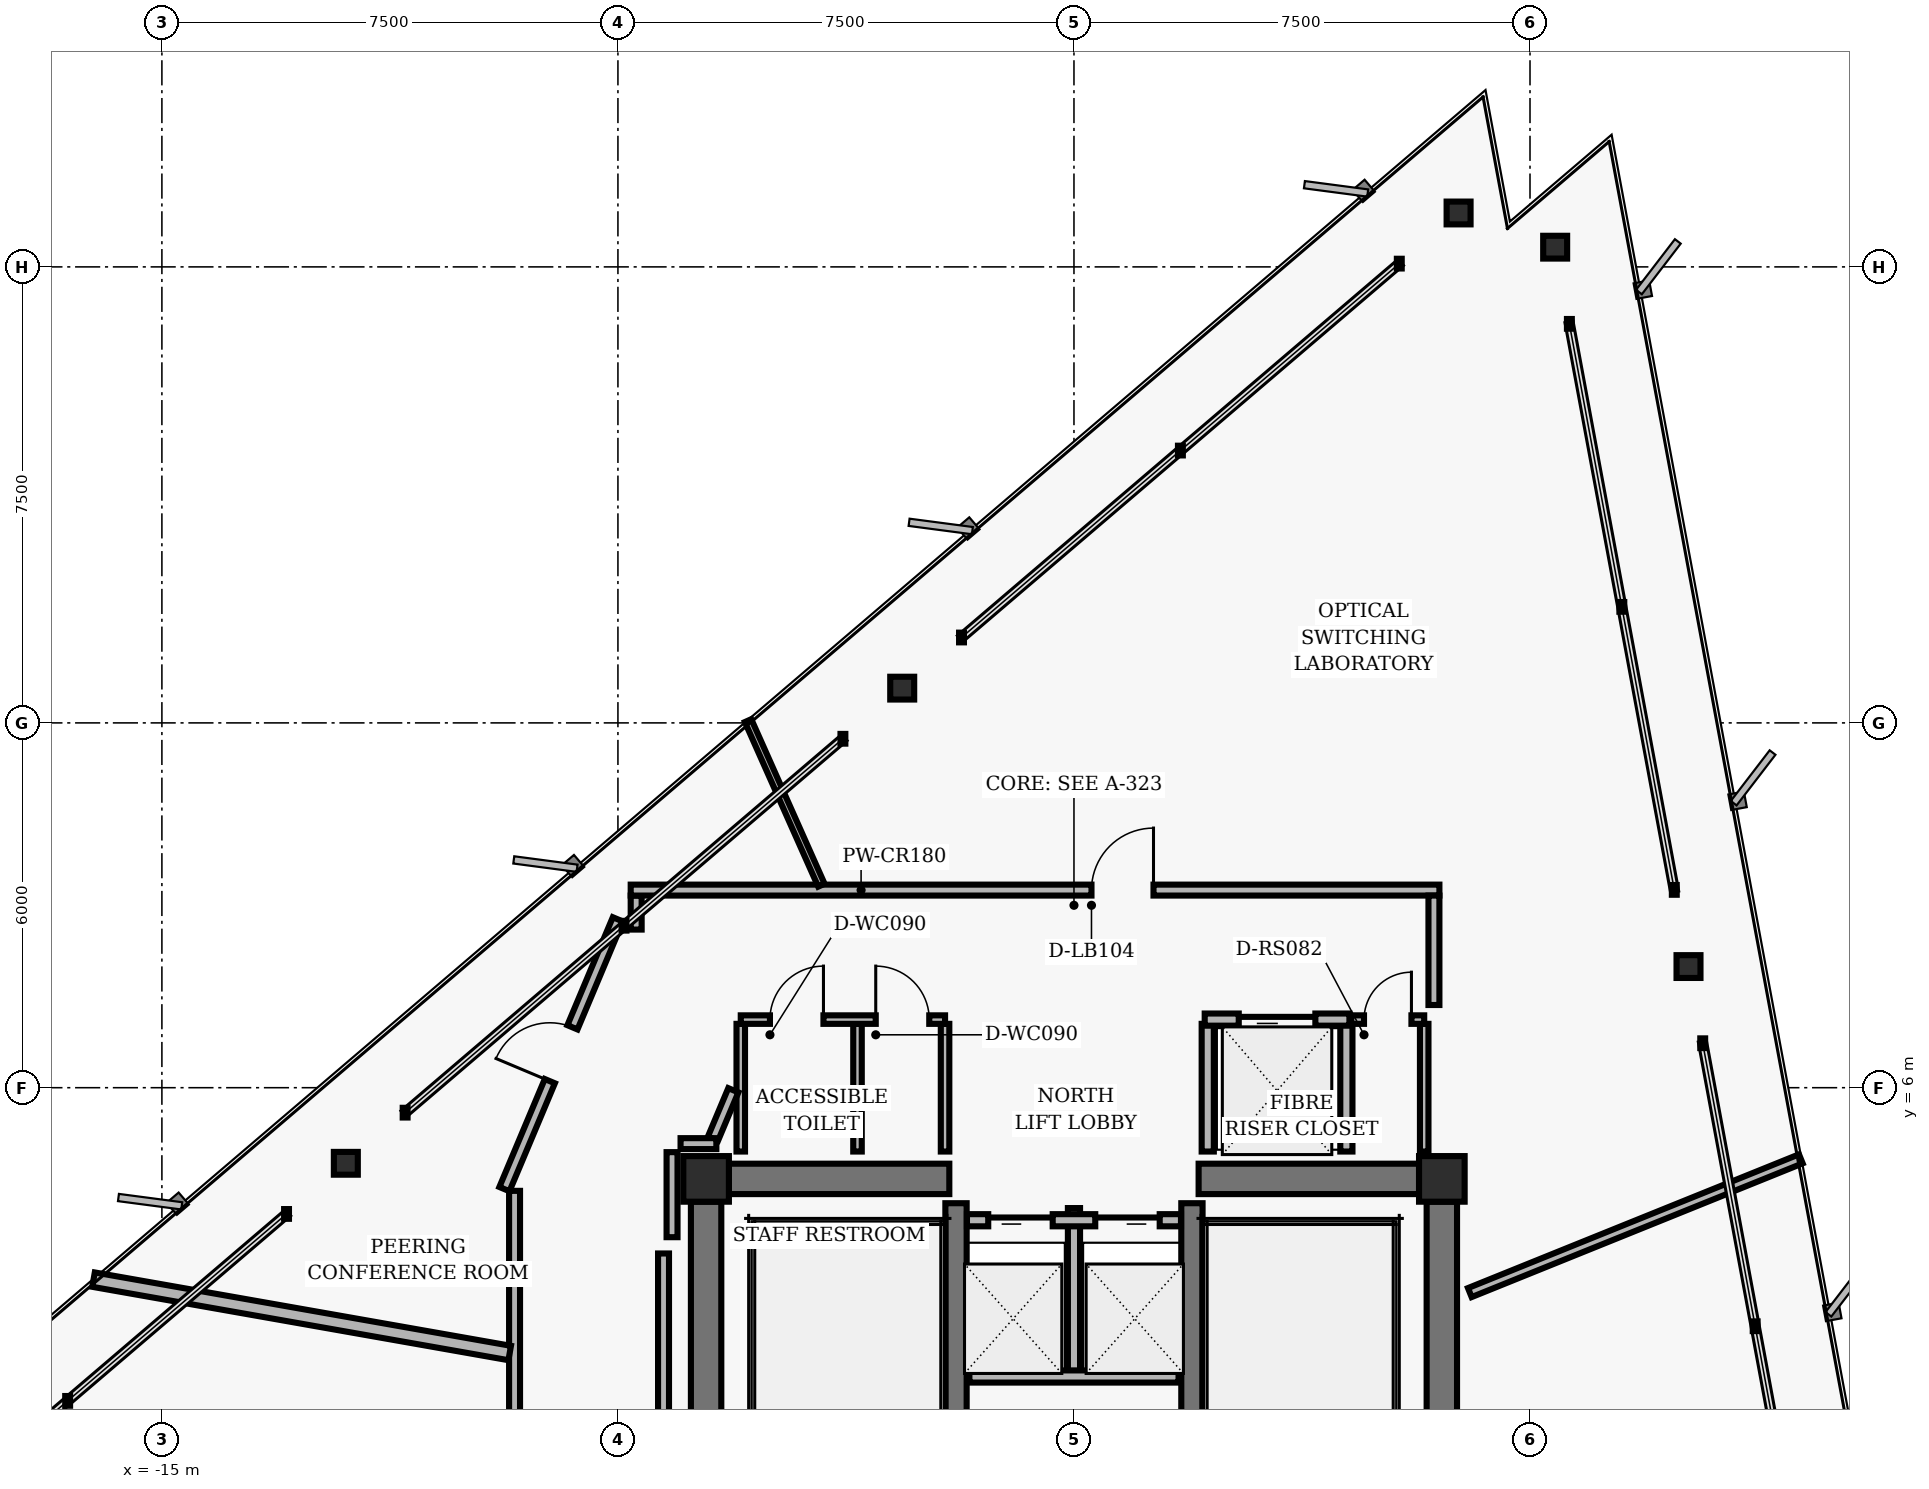
"""IFC4 building model, lengths in metres.
Left out: names, types, materials, properties, quantities, classifications, styles, units other than length and angle.
Written with IfcOpenShell. Run it as: python <this file> out.ifc"""

import sys

from ifc_helpers import new_model, si_unit, direction, frame, frame_2d, origin, origin_2d, place, context, subcontext, project, spatial, rectangle, hollow_rectangle, i_section, extrude, element, fill, save


model = new_model("IFC4")
c1 = context("Model", 3, precision=1e-05, world=origin(), true_north=direction((0.0, 1.0)))
c2 = subcontext(c1, "Body", "Model", "MODEL_VIEW")
j1 = project(units=[si_unit("LENGTHUNIT", "METRE"), si_unit("PLANEANGLEUNIT", "RADIAN")], contexts=[c1])
p1 = place(None, origin())
s1 = spatial("IfcSite", under=j1, at=p1, CompositionType="ELEMENT")
p2 = place(p1, origin())
s2 = spatial("IfcBuilding", under=s1, at=p2, CompositionType="ELEMENT")
p3 = place(p2, frame((0.0, 0.0, 187.52)))
s3 = spatial("IfcBuildingStorey", under=s2, at=p3, CompositionType="ELEMENT", Elevation=187.52)
for number, where, z_axis, x_axis in (
    (1, (-6.05, 4.5, 0.0), (0.0, 0.0, 1.0), (1.0, 0.0, 0.0)),
    (2, (6.05, 4.5, 0.0), (0.0, 0.0, 1.0), (1.0, 0.0, 0.0)),
):
    element("IfcColumn", number, at=place(p3, frame(where, z_axis=z_axis, x_axis=x_axis)), inside=s3, PredefinedType="COLUMN", context=c2, shape_type="SweptSolid", body=[
        extrude(hollow_rectangle(XDim=0.75, YDim=0.75, WallThickness=0.05, InnerFilletRadius=0.02, OuterFilletRadius=0.04, at=origin_2d()), origin(), (0.0, 0.0, 1.0), 3.04),
    ])
for number, where, z_axis, x_axis in (
    (3, (-6.05, 0.375, 0.0), (0.0, 0.0, 1.0), (0.0, 1.0, 0.0)),
    (4, (6.05, 0.375, 0.0), (0.0, 0.0, 1.0), (0.0, 1.0, 0.0)),
):
    element("IfcWall", number, at=place(p3, frame(where, z_axis=z_axis, x_axis=x_axis)), inside=s3, PredefinedType="SHEAR", context=c2, shape_type="SweptSolid", body=[
        extrude(rectangle(XDim=3.75, YDim=0.5, at=frame_2d((1.875, 0.0))), origin(), (0.0, 0.0, 1.0), 2.798),
    ])
for number, where, z_axis, x_axis in (
    (5, (-1.94, -4.1, 0.0), (0.0, 0.0, 1.0), (0.0, 1.0, 0.0)),
    (6, (1.94, -4.1, 0.0), (0.0, 0.0, 1.0), (0.0, 1.0, 0.0)),
):
    element("IfcWall", number, at=place(p3, frame(where, z_axis=z_axis, x_axis=x_axis)), inside=s3, PredefinedType="SHEAR", context=c2, shape_type="SweptSolid", body=[
        extrude(rectangle(XDim=8.2, YDim=0.35, at=frame_2d((4.1, 0.0))), origin(), (0.0, 0.0, 1.0), 2.798),
    ])
for number, where, z_axis, x_axis in (
    (7, (-5.675, 4.5, 0.0), (0.0, 0.0, 1.0), (1.0, 0.0, 0.0)),
    (8, (2.05, 4.5, 0.0), (0.0, 0.0, 1.0), (1.0, 0.0, 0.0)),
):
    element("IfcWall", number, at=place(p3, frame(where, z_axis=z_axis, x_axis=x_axis)), inside=s3, PredefinedType="SHEAR", context=c2, shape_type="SweptSolid", body=[
        extrude(rectangle(XDim=3.625, YDim=0.5, at=frame_2d((1.812, 0.0))), origin(), (0.0, 0.0, 1.0), 2.798),
    ])
for number, where, z_axis, x_axis in (
    (9, (10.107, 7.992, 0.0), (0.0, 0.0, 1.0), (1.0, 0.0, 0.0)),
    (10, (7.914, 19.824, 0.0), (0.0, 0.0, 1.0), (1.0, 0.0, 0.0)),
    (11, (6.325, 20.387, 0.0), (0.0, 0.0, 1.0), (1.0, 0.0, 0.0)),
    (12, (-2.825, 12.572, 0.0), (0.0, 0.0, 1.0), (1.0, 0.0, 0.0)),
    (13, (-11.975, 4.757, 0.0), (0.0, 0.0, 1.0), (1.0, 0.0, 0.0)),
):
    element("IfcColumn", number, at=place(p3, frame(where, z_axis=z_axis, x_axis=x_axis)), inside=s3, PredefinedType="COLUMN", context=c2, shape_type="SweptSolid", body=[
        extrude(i_section(OverallWidth=0.394, OverallDepth=0.375, WebThickness=0.017, FlangeThickness=0.028, FilletRadius=0.016, at=origin_2d()), origin(), (0.0, 0.0, 1.0), 3.04),
    ])
p4 = place(p3, frame((0.0, 1.25, 0.0), z_axis=(0.0, 0.0, 1.0), x_axis=(0.0, 1.0, 0.0)))
e14 = element("IfcWall", 14, at=p4, inside=s3, PredefinedType="PARTITIONING", context=c2, shape_type="SweptSolid", body=[
    extrude(rectangle(XDim=2.77, YDim=0.2, at=frame_2d((1.385, 0.0))), origin(), (0.0, 0.0, 1.0), 2.773),
])
p5 = place(p3, frame((-1.72, 1.25, 0.0), z_axis=(0.0, 0.0, 1.0), x_axis=(1.0, 0.0, 0.0)))
e15 = element("IfcWall", 15, at=p5, inside=s3, PredefinedType="PARTITIONING", context=c2, shape_type="SweptSolid", body=[
    extrude(rectangle(XDim=3.44, YDim=0.2, at=frame_2d((1.72, 0.0))), origin(), (0.0, 0.0, 1.0), 2.773),
])
p6 = place(p3, frame((-1.76, 3.82, 0.0), z_axis=(0.0, 0.0, 1.0), x_axis=(1.0, 0.0, 0.0)))
e16 = element("IfcWall", 16, at=p6, inside=s3, PredefinedType="PARTITIONING", context=c2, shape_type="SweptSolid", body=[
    extrude(rectangle(XDim=3.52, YDim=0.2, at=frame_2d((1.76, 0.0))), origin(), (0.0, 0.0, 1.0), 2.773),
])
p7 = place(p6, frame((0.35, 0.0, 0.0)))
e17 = element("IfcOpeningElement", 17, at=p7, cuts=e16, PredefinedType="OPENING", context=c2, shape_type="SweptSolid", body=[
    extrude(rectangle(XDim=1.06, YDim=2.04, at=frame_2d((0.53, 1.02))), frame((0.0, 0.11, 0.0), z_axis=(0.0, -1.0, 0.0), x_axis=(1.0, 0.0, 0.0)), (0.0, 0.0, 1.0), 0.22),
])
p8 = place(p6, frame((2.11, 0.0, 0.0)))
e18 = element("IfcOpeningElement", 18, at=p8, cuts=e16, PredefinedType="OPENING", context=c2, shape_type="SweptSolid", body=[
    extrude(rectangle(XDim=1.06, YDim=2.04, at=frame_2d((0.53, 1.02))), frame((0.0, 0.11, 0.0), z_axis=(0.0, -1.0, 0.0), x_axis=(1.0, 0.0, 0.0)), (0.0, 0.0, 1.0), 0.22),
])
for number, where, z_axis, x_axis in (
    (19, (2.2, 4.95, 0.0), (0.0, 0.0, 1.0), (0.0, 1.0, 0.0)),
    (20, (4.48, 4.95, 0.0), (0.0, 0.0, 1.0), (0.0, 1.0, 0.0)),
):
    element("IfcWall", number, at=place(p3, frame(where, z_axis=z_axis, x_axis=x_axis)), inside=s3, PredefinedType="PARTITIONING", context=c2, shape_type="SweptSolid", body=[
        extrude(rectangle(XDim=2.1, YDim=0.2, at=frame_2d((1.05, 0.0))), origin(), (0.0, 0.0, 1.0), 2.773),
    ])
p9 = place(p3, frame((2.15, 7.12, 0.0), z_axis=(0.0, 0.0, 1.0), x_axis=(1.0, 0.0, 0.0)))
e21 = element("IfcWall", 21, at=p9, inside=s3, PredefinedType="PARTITIONING", context=c2, shape_type="SweptSolid", body=[
    extrude(rectangle(XDim=2.38, YDim=0.2, at=frame_2d((1.19, 0.0))), origin(), (0.0, 0.0, 1.0), 2.773),
])
p10 = place(p9, frame((0.56, 0.0, 0.0)))
e22 = element("IfcOpeningElement", 22, at=p10, cuts=e21, PredefinedType="OPENING", context=c2, shape_type="SweptSolid", body=[
    extrude(rectangle(XDim=1.26, YDim=2.06, at=frame_2d((0.63, 1.03))), frame((0.0, 0.11, 0.0), z_axis=(0.0, -1.0, 0.0), x_axis=(1.0, 0.0, 0.0)), (0.0, 0.0, 1.0), 0.22),
])
for number, where, z_axis, x_axis in (
    (23, (-5.48, 4.95, 0.0), (0.0, 0.0, 1.0), (0.0, 1.0, 0.0)),
    (24, (-3.56, 4.95, 0.0), (0.0, 0.0, 1.0), (0.0, 1.0, 0.0)),
    (25, (-2.12, 4.95, 0.0), (0.0, 0.0, 1.0), (0.0, 1.0, 0.0)),
):
    element("IfcWall", number, at=place(p3, frame(where, z_axis=z_axis, x_axis=x_axis)), inside=s3, PredefinedType="PARTITIONING", context=c2, shape_type="SweptSolid", body=[
        extrude(rectangle(XDim=2.1, YDim=0.14, at=frame_2d((1.05, 0.0))), origin(), (0.0, 0.0, 1.0), 2.773),
    ])
p11 = place(p3, frame((-5.48, 7.12, 0.0), z_axis=(0.0, 0.0, 1.0), x_axis=(1.0, 0.0, 0.0)))
e26 = element("IfcWall", 26, at=p11, inside=s3, PredefinedType="PARTITIONING", context=c2, shape_type="SweptSolid", body=[
    extrude(rectangle(XDim=3.36, YDim=0.14, at=frame_2d((1.68, 0.0))), origin(), (0.0, 0.0, 1.0), 2.773),
])
p12 = place(p11, frame((0.48, 0.0, 0.0)))
e27 = element("IfcOpeningElement", 27, at=p12, cuts=e26, PredefinedType="OPENING", context=c2, shape_type="SweptSolid", body=[
    extrude(rectangle(XDim=0.88, YDim=2.02, at=frame_2d((0.44, 1.01))), frame((0.0, 0.08, 0.0), z_axis=(0.0, -1.0, 0.0), x_axis=(1.0, 0.0, 0.0)), (0.0, 0.0, 1.0), 0.16),
])
p13 = place(p11, frame((2.22, 0.0, 0.0)))
e28 = element("IfcOpeningElement", 28, at=p13, cuts=e26, PredefinedType="OPENING", context=c2, shape_type="SweptSolid", body=[
    extrude(rectangle(XDim=0.88, YDim=2.02, at=frame_2d((0.44, 1.01))), frame((0.0, 0.08, 0.0), z_axis=(0.0, -1.0, 0.0), x_axis=(1.0, 0.0, 0.0)), (0.0, 0.0, 1.0), 0.16),
])
p14 = place(p3, frame((5.76, 4.95, 0.0), z_axis=(0.0, 0.0, 1.0), x_axis=(0.0, 1.0, 0.0)))
e29 = element("IfcWall", 29, at=p14, inside=s3, PredefinedType="PARTITIONING", context=c2, shape_type="SweptSolid", body=[
    extrude(rectangle(XDim=2.1, YDim=0.14, at=frame_2d((1.05, 0.0))), origin(), (0.0, 0.0, 1.0), 2.253),
])
p15 = place(p3, frame((4.56, 7.12, 0.0), z_axis=(0.0, 0.0, 1.0), x_axis=(1.0, 0.0, 0.0)))
e30 = element("IfcWall", 30, at=p15, inside=s3, PredefinedType="PARTITIONING", context=c2, shape_type="SweptSolid", body=[
    extrude(rectangle(XDim=1.2, YDim=0.14, at=frame_2d((0.6, 0.0))), origin(), (0.0, 0.0, 1.0), 2.773),
])
p16 = place(p15, frame((0.21, 0.0, 0.0)))
e31 = element("IfcOpeningElement", 31, at=p16, cuts=e30, PredefinedType="OPENING", context=c2, shape_type="SweptSolid", body=[
    extrude(rectangle(XDim=0.78, YDim=2.01, at=frame_2d((0.39, 1.005))), frame((0.0, 0.08, 0.0), z_axis=(0.0, -1.0, 0.0), x_axis=(1.0, 0.0, 0.0)), (0.0, 0.0, 1.0), 0.16),
])
p17 = place(p3, frame((-9.2, -4.303, 0.0), z_axis=(0.0, 0.0, 1.0), x_axis=(0.0, 1.0, 0.0)))
e32 = element("IfcWall", 32, at=p17, inside=s3, PredefinedType="PARTITIONING", context=c2, shape_type="SweptSolid", body=[
    extrude(rectangle(XDim=8.607, YDim=0.18, at=frame_2d((4.303, 0.0))), origin(), (0.0, 0.0, 1.0), 2.773),
])
p18 = place(p17, frame((2.619, 0.0, 0.0)))
e33 = element("IfcOpeningElement", 33, at=p18, cuts=e32, PredefinedType="OPENING", context=c2, shape_type="SweptSolid", body=[
    extrude(rectangle(XDim=0.96, YDim=2.02, at=frame_2d((0.48, 1.01))), frame((0.0, 0.1, 0.0), z_axis=(0.0, -1.0, 0.0), x_axis=(1.0, 0.0, 0.0)), (0.0, 0.0, 1.0), 0.2),
])
p19 = place(p3, frame((-9.367, 4.332, 0.0), z_axis=(0.0, 0.0, 1.0), x_axis=(0.387573945081, 0.921838617706, 0.0)))
e34 = element("IfcWall", 34, at=p19, inside=s3, PredefinedType="PARTITIONING", context=c2, shape_type="SweptSolid", body=[
    extrude(rectangle(XDim=4.813, YDim=0.18, at=frame_2d((2.407, 0.0))), origin(), (0.0, 0.0, 1.0), 2.395),
])
p20 = place(p19, frame((1.927, 0.0, 0.0)))
e35 = element("IfcOpeningElement", 35, at=p20, cuts=e34, PredefinedType="OPENING", context=c2, shape_type="SweptSolid", body=[
    extrude(rectangle(XDim=0.96, YDim=2.02, at=frame_2d((0.48, 1.01))), frame((0.0, 0.1, 0.0), z_axis=(0.0, -1.0, 0.0), x_axis=(1.0, 0.0, 0.0)), (0.0, 0.0, 1.0), 0.2),
])
p21 = place(p3, frame((-7.2, 8.601, 0.0), z_axis=(0.0, 0.0, 1.0), x_axis=(0.0, 1.0, 0.0)))
e36 = element("IfcWall", 36, at=p21, inside=s3, PredefinedType="PARTITIONING", context=c2, shape_type="SweptSolid", body=[
    extrude(rectangle(XDim=0.559, YDim=0.18, at=frame_2d((0.28, 0.0))), origin(), (0.0, 0.0, 1.0), 2.773),
])
p22 = place(p3, frame((-7.29, 9.25, 0.0), z_axis=(0.0, 0.0, 1.0), x_axis=(1.0, 0.0, 0.0)))
e37 = element("IfcWall", 37, at=p22, inside=s3, PredefinedType="PARTITIONING", context=c2, shape_type="SweptSolid", body=[
    extrude(rectangle(XDim=13.3, YDim=0.18, at=frame_2d((6.65, 0.0))), origin(), (0.0, 0.0, 1.0), 2.773),
])
p23 = place(p22, frame((7.578, 0.0, 0.0)))
e38 = element("IfcOpeningElement", 38, at=p23, cuts=e37, PredefinedType="OPENING", context=c2, shape_type="SweptSolid", body=[
    extrude(rectangle(XDim=1.02, YDim=2.02, at=frame_2d((0.51, 1.01))), frame((0.0, 0.1, 0.0), z_axis=(0.0, -1.0, 0.0), x_axis=(1.0, 0.0, 0.0)), (0.0, 0.0, 1.0), 0.2),
])
p24 = place(p3, frame((5.92, 9.16, 0.0), z_axis=(0.0, 0.0, 1.0), x_axis=(0.0, -1.0, 0.0)))
e39 = element("IfcWall", 39, at=p24, inside=s3, PredefinedType="PARTITIONING", context=c2, shape_type="SweptSolid", body=[
    extrude(rectangle(XDim=1.8, YDim=0.18, at=frame_2d((0.9, 0.0))), origin(), (0.0, 0.0, 1.0), 2.253),
])
p25 = place(p3, frame((-5.602, 5.958, 0.0), z_axis=(0.0, 0.0, 1.0), x_axis=(-0.387588639363, -0.921832439566, 0.0)))
e40 = element("IfcWall", 40, at=p25, inside=s3, PredefinedType="PARTITIONING", context=c2, shape_type="SweptSolid", body=[
    extrude(rectangle(XDim=0.862, YDim=0.18, at=frame_2d((0.431, 0.0))), origin(), (0.0, 0.0, 1.0), 2.773),
])
p26 = place(p3, frame((-5.881, 5.08, 0.0), z_axis=(0.0, 0.0, 1.0), x_axis=(-1.0, 0.0, 0.0)))
e41 = element("IfcWall", 41, at=p26, inside=s3, PredefinedType="PARTITIONING", context=c2, shape_type="SweptSolid", body=[
    extrude(rectangle(XDim=0.589, YDim=0.18, at=frame_2d((0.294, 0.0))), origin(), (0.0, 0.0, 1.0), 2.773),
])
p27 = place(p3, frame((-6.61, 4.94, 0.0), z_axis=(0.0, 0.0, 1.0), x_axis=(0.0, -1.0, 0.0)))
e42 = element("IfcWall", 42, at=p27, inside=s3, PredefinedType="PARTITIONING", context=c2, shape_type="SweptSolid", body=[
    extrude(rectangle(XDim=1.399, YDim=0.18, at=frame_2d((0.699, 0.0))), origin(), (0.0, 0.0, 1.0), 2.773),
])
p28 = place(p3, frame((-6.75, 3.273, 0.0), z_axis=(0.0, 0.0, 1.0), x_axis=(0.0, -1.0, 0.0)))
e43 = element("IfcWall", 43, at=p28, inside=s3, PredefinedType="PARTITIONING", context=c2, shape_type="SweptSolid", body=[
    extrude(rectangle(XDim=6.547, YDim=0.18, at=frame_2d((3.273, 0.0))), origin(), (0.0, 0.0, 1.0), 2.773),
])
p29 = place(p3, frame((6.51, 2.63, 0.0), z_axis=(0.0, 0.0, 1.0), x_axis=(0.927189354085, 0.374592981342, 0.0)))
e44 = element("IfcWall", 44, at=p29, inside=s3, PredefinedType="PARTITIONING", context=c2, shape_type="SweptSolid", body=[
    extrude(rectangle(XDim=5.872, YDim=0.16, at=frame_2d((2.936, 0.0))), origin(), (0.0, 0.0, 1.0), 2.773),
])
p30 = place(p3, frame((-4.154, 9.33, 0.0), z_axis=(0.0, 0.0, 1.0), x_axis=(-0.406726956158, 0.913549770475, 0.0)))
e45 = element("IfcWall", 45, at=p30, inside=s3, PredefinedType="MOVABLE", context=c2, shape_type="SweptSolid", body=[
    extrude(rectangle(XDim=2.963, YDim=0.115, at=frame_2d((1.482, 0.0))), origin(), (0.0, 0.0, 1.0), 2.773),
])
p31 = place(p3, frame((-9.28, 1.636, 0.0), z_axis=(0.0, 0.0, 1.0), x_axis=(-0.984803709336, 0.173671108934, 0.0)))
e46 = element("IfcWall", 46, at=p31, inside=s3, PredefinedType="PARTITIONING", context=c2, shape_type="SweptSolid", body=[
    extrude(rectangle(XDim=6.95, YDim=0.24, at=frame_2d((3.475, 0.0))), origin(), (0.0, 0.0, 1.0), 2.773),
])
p32 = place(p7, origin())
e47 = element("IfcDoor", 47, at=p32, inside=s3, OperationType="SLIDING_TO_LEFT", PredefinedType="DOOR", context=c2, shape_type="SweptSolid", body=[
    extrude(rectangle(XDim=1.06, YDim=2.04, at=frame_2d((0.53, 1.02))), frame((0.0, 0.025, 0.0), z_axis=(0.0, -1.0, 0.0), x_axis=(1.0, 0.0, 0.0)), (0.0, 0.0, 1.0), 0.05),
])
fill(e17, e47)
p33 = place(p8, origin())
e48 = element("IfcDoor", 48, at=p33, inside=s3, OperationType="SLIDING_TO_RIGHT", PredefinedType="DOOR", context=c2, shape_type="SweptSolid", body=[
    extrude(rectangle(XDim=1.06, YDim=2.04, at=frame_2d((0.53, 1.02))), frame((0.0, 0.025, 0.0), z_axis=(0.0, -1.0, 0.0), x_axis=(1.0, 0.0, 0.0)), (0.0, 0.0, 1.0), 0.05),
])
fill(e18, e48)
p34 = place(p10, origin())
e49 = element("IfcDoor", 49, at=p34, inside=s3, OperationType="SLIDING_TO_LEFT", PredefinedType="DOOR", context=c2, shape_type="SweptSolid", body=[
    extrude(rectangle(XDim=1.26, YDim=2.06, at=frame_2d((0.63, 1.03))), frame((0.0, 0.025, 0.0), z_axis=(0.0, -1.0, 0.0), x_axis=(1.0, 0.0, 0.0)), (0.0, 0.0, 1.0), 0.05),
])
fill(e22, e49)
p35 = place(p12, origin())
e50 = element("IfcDoor", 50, at=p35, inside=s3, OperationType="SINGLE_SWING_RIGHT", PredefinedType="DOOR", context=c2, shape_type="SweptSolid", body=[
    extrude(rectangle(XDim=0.88, YDim=2.02, at=frame_2d((0.44, 1.01))), frame((0.0, 0.025, 0.0), z_axis=(0.0, -1.0, 0.0), x_axis=(1.0, 0.0, 0.0)), (0.0, 0.0, 1.0), 0.05),
])
fill(e27, e50)
p36 = place(p13, origin())
e51 = element("IfcDoor", 51, at=p36, inside=s3, OperationType="SINGLE_SWING_LEFT", PredefinedType="DOOR", context=c2, shape_type="SweptSolid", body=[
    extrude(rectangle(XDim=0.88, YDim=2.02, at=frame_2d((0.44, 1.01))), frame((0.0, 0.025, 0.0), z_axis=(0.0, -1.0, 0.0), x_axis=(1.0, 0.0, 0.0)), (0.0, 0.0, 1.0), 0.05),
])
fill(e28, e51)
p37 = place(p16, origin())
e52 = element("IfcDoor", 52, at=p37, inside=s3, OperationType="SINGLE_SWING_RIGHT", PredefinedType="DOOR", context=c2, shape_type="SweptSolid", body=[
    extrude(rectangle(XDim=0.78, YDim=2.01, at=frame_2d((0.39, 1.005))), frame((0.0, 0.025, 0.0), z_axis=(0.0, -1.0, 0.0), x_axis=(1.0, 0.0, 0.0)), (0.0, 0.0, 1.0), 0.05),
])
fill(e31, e52)
p38 = place(p23, origin())
e53 = element("IfcDoor", 53, at=p38, inside=s3, OperationType="SINGLE_SWING_RIGHT", PredefinedType="DOOR", context=c2, shape_type="SweptSolid", body=[
    extrude(rectangle(XDim=1.02, YDim=2.02, at=frame_2d((0.51, 1.01))), frame((0.0, 0.025, 0.0), z_axis=(0.0, -1.0, 0.0), x_axis=(1.0, 0.0, 0.0)), (0.0, 0.0, 1.0), 0.05),
])
fill(e38, e53)
p39 = place(p20, origin())
e54 = element("IfcDoor", 54, at=p39, inside=s3, OperationType="SINGLE_SWING_LEFT", PredefinedType="DOOR", context=c2, shape_type="SweptSolid", body=[
    extrude(rectangle(XDim=0.96, YDim=2.02, at=frame_2d((0.48, 1.01))), frame((0.0, 0.025, 0.0), z_axis=(0.0, -1.0, 0.0), x_axis=(1.0, 0.0, 0.0)), (0.0, 0.0, 1.0), 0.05),
])
fill(e35, e54)
save(model, sys.argv[1])
